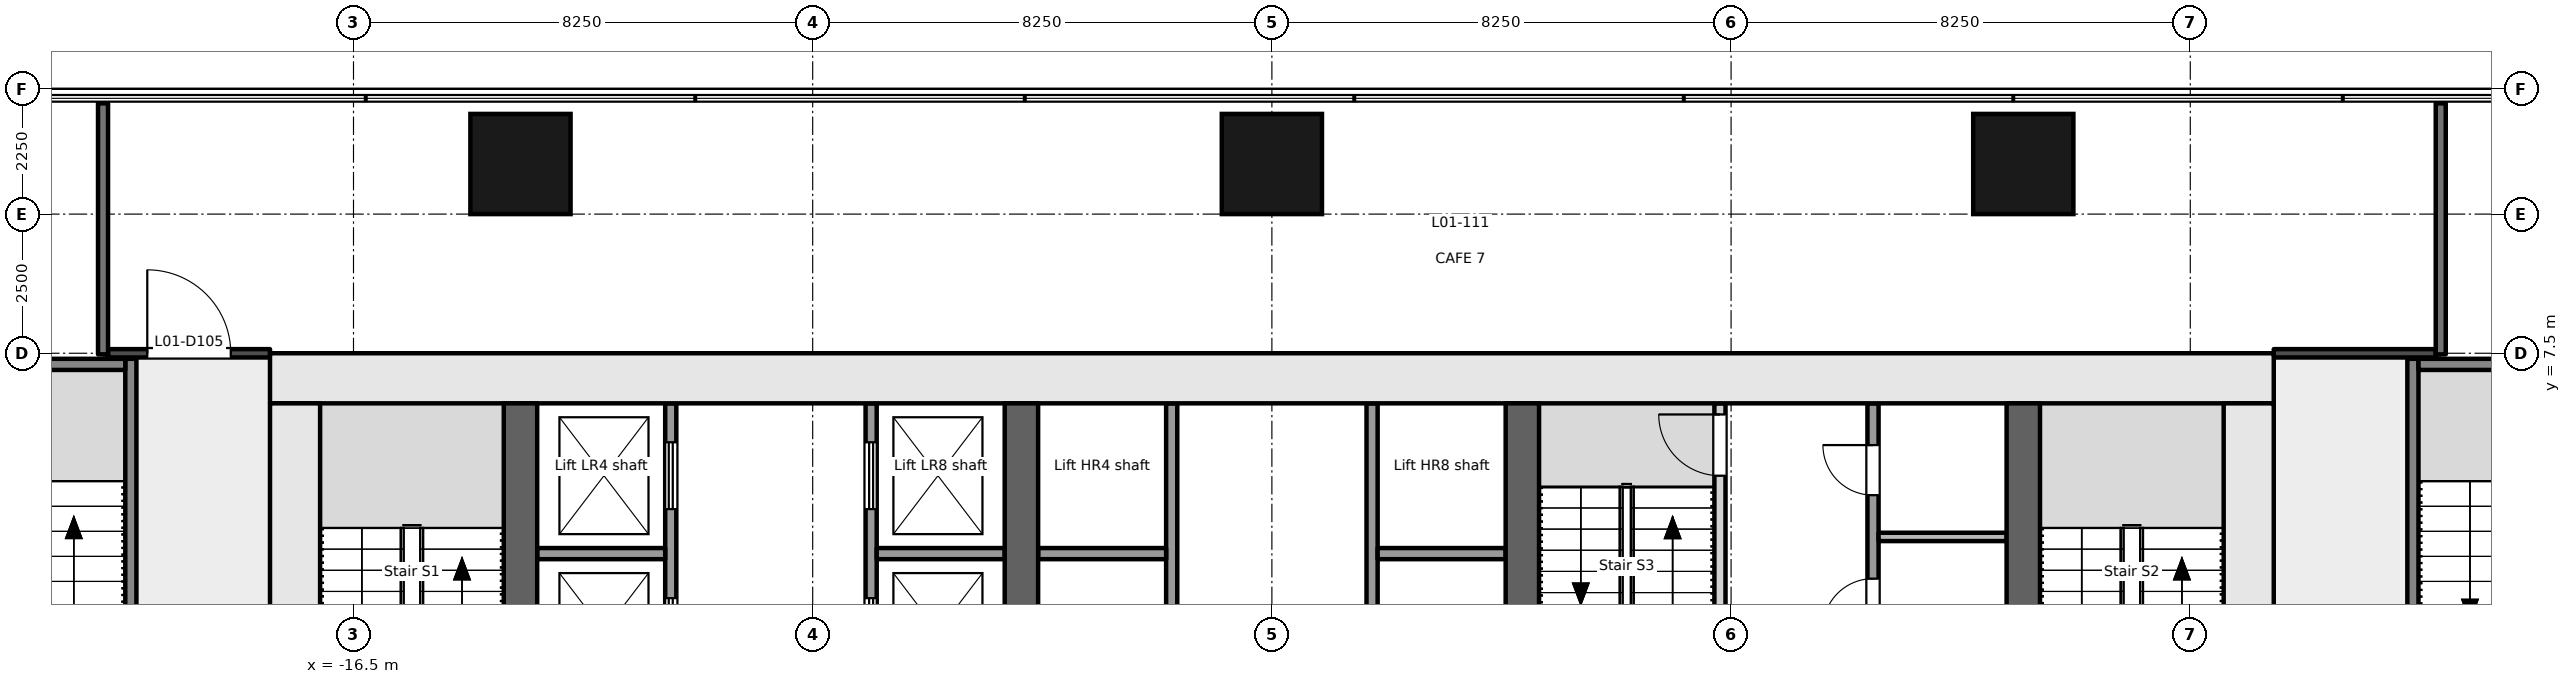
"""IFC4 building model, lengths in metres.
Left out: names, types, materials, properties, quantities, classifications, styles, units other than length and angle.
Written with IfcOpenShell. Run it as: python <this file> out.ifc"""

import sys

from ifc_helpers import new_model, si_unit, direction, frame, frame_2d, origin, origin_2d, place, context, subcontext, project, spatial, rectangle, extrude, element, fill, save


model = new_model("IFC4")
c1 = context("Model", 3, precision=1e-05, world=origin(), true_north=direction((0.0, 1.0)))
c2 = subcontext(c1, "Body", "Model", "MODEL_VIEW")
j1 = project(units=[si_unit("LENGTHUNIT", "METRE"), si_unit("PLANEANGLEUNIT", "RADIAN")], contexts=[c1])
p1 = place(None, origin())
s1 = spatial("IfcSite", under=j1, at=p1, CompositionType="ELEMENT")
p2 = place(p1, origin())
s2 = spatial("IfcBuilding", under=s1, at=p2, CompositionType="ELEMENT")
p3 = place(p2, frame((0.0, 0.0, 7.2)))
s3 = spatial("IfcBuildingStorey", under=s2, at=p3, CompositionType="ELEMENT", Elevation=7.2)
for number, where, z_axis, x_axis in (
    (1, (-13.5, 10.9, -0.2), (0.0, 0.0, 1.0), (1.0, 0.0, 0.0)),
    (2, (0.0, 10.9, -0.2), (0.0, 0.0, 1.0), (1.0, 0.0, 0.0)),
    (3, (13.5, 10.9, -0.2), (0.0, 0.0, 1.0), (1.0, 0.0, 0.0)),
):
    element("IfcColumn", number, at=place(p3, frame(where, z_axis=z_axis, x_axis=x_axis)), inside=s3, PredefinedType="COLUMN", context=c2, shape_type="SweptSolid", body=[
        extrude(rectangle(XDim=1.8, YDim=1.8, at=origin_2d()), origin(), (0.0, 0.0, 1.0), 5.4),
    ])
p4 = place(p3, frame((-18.0, 7.05, -0.2), z_axis=(0.0, 0.0, 1.0), x_axis=(1.0, 0.0, 0.0)))
e4 = element("IfcWall", 4, at=p4, inside=s3, PredefinedType="SHEAR", context=c2, shape_type="SweptSolid", body=[
    extrude(rectangle(XDim=36.0, YDim=0.9, at=frame_2d((18.0, 0.0))), origin(), (0.0, 0.0, 1.0), 5.4),
])
p5 = place(p3, frame((-17.55, -6.6, -0.2), z_axis=(0.0, 0.0, 1.0), x_axis=(0.0, 1.0, 0.0)))
e5 = element("IfcWall", 5, at=p5, inside=s3, PredefinedType="SHEAR", context=c2, shape_type="SweptSolid", body=[
    extrude(rectangle(XDim=13.2, YDim=0.9, at=frame_2d((6.6, 0.0))), origin(), (0.0, 0.0, 1.0), 5.4),
])
p6 = place(p5, frame((4.55, 0.0, 0.2)))
e6 = element("IfcOpeningElement", 6, at=p6, cuts=e5, PredefinedType="OPENING", context=c2, shape_type="SweptSolid", body=[
    extrude(rectangle(XDim=1.2, YDim=2.1, at=frame_2d((0.6, 1.05))), frame((0.0, 0.46, 0.0), z_axis=(0.0, -1.0, 0.0), x_axis=(1.0, 0.0, 0.0)), (0.0, 0.0, 1.0), 0.921),
])
p7 = place(p3, frame((17.55, -6.6, -0.2), z_axis=(0.0, 0.0, 1.0), x_axis=(0.0, 1.0, 0.0)))
e7 = element("IfcWall", 7, at=p7, inside=s3, PredefinedType="SHEAR", context=c2, shape_type="SweptSolid", body=[
    extrude(rectangle(XDim=13.2, YDim=0.9, at=frame_2d((6.6, 0.0))), origin(), (0.0, 0.0, 1.0), 5.4),
])
p8 = place(p7, frame((4.55, 0.0, 0.2)))
e8 = element("IfcOpeningElement", 8, at=p8, cuts=e7, PredefinedType="OPENING", context=c2, shape_type="SweptSolid", body=[
    extrude(rectangle(XDim=1.2, YDim=2.1, at=frame_2d((0.6, 1.05))), frame((0.0, 0.46, 0.0), z_axis=(0.0, -1.0, 0.0), x_axis=(1.0, 0.0, 0.0)), (0.0, 0.0, 1.0), 0.921),
])
for number, where, z_axis, x_axis in (
    (9, (-13.5, -6.6, -0.2), (0.0, 0.0, 1.0), (0.0, 1.0, 0.0)),
    (10, (-4.5, -6.6, -0.2), (0.0, 0.0, 1.0), (0.0, 1.0, 0.0)),
    (11, (4.5, -6.6, -0.2), (0.0, 0.0, 1.0), (0.0, 1.0, 0.0)),
    (12, (13.5, -6.6, -0.2), (0.0, 0.0, 1.0), (0.0, 1.0, 0.0)),
):
    element("IfcWall", number, at=place(p3, frame(where, z_axis=z_axis, x_axis=x_axis)), inside=s3, PredefinedType="SHEAR", context=c2, shape_type="SweptSolid", body=[
        extrude(rectangle(XDim=13.2, YDim=0.6, at=frame_2d((6.6, 0.0))), origin(), (0.0, 0.0, 1.0), 5.4),
    ])
p9 = place(p3, frame((-10.8, -6.6, 0.0), z_axis=(0.0, 0.0, 1.0), x_axis=(0.0, 1.0, 0.0)))
e13 = element("IfcWall", 13, at=p9, inside=s3, PredefinedType="PARTITIONING", context=c2, shape_type="SweptSolid", body=[
    extrude(rectangle(XDim=13.2, YDim=0.2, at=frame_2d((6.6, 0.0))), origin(), (0.0, 0.0, 1.0), 5.2),
])
p10 = place(p9, frame((0.55, 0.0, 0.0)))
e14 = element("IfcOpeningElement", 14, at=p10, cuts=e13, PredefinedType="OPENING", context=c2, shape_type="SweptSolid", body=[
    extrude(rectangle(XDim=0.9, YDim=2.1, at=frame_2d((0.45, 1.05))), frame((0.0, 0.111, 0.0), z_axis=(0.0, -1.0, 0.0), x_axis=(1.0, 0.0, 0.0)), (0.0, 0.0, 1.0), 0.221),
])
p11 = place(p9, frame((2.9, 0.0, 0.0)))
e15 = element("IfcOpeningElement", 15, at=p11, cuts=e13, PredefinedType="OPENING", context=c2, shape_type="SweptSolid", body=[
    extrude(rectangle(XDim=1.2, YDim=2.1, at=frame_2d((0.6, 1.05))), frame((0.0, 0.111, 0.0), z_axis=(0.0, -1.0, 0.0), x_axis=(1.0, 0.0, 0.0)), (0.0, 0.0, 1.0), 0.221),
])
p12 = place(p9, frame((5.7, 0.0, 0.0)))
e16 = element("IfcOpeningElement", 16, at=p12, cuts=e13, PredefinedType="OPENING", context=c2, shape_type="SweptSolid", body=[
    extrude(rectangle(XDim=1.2, YDim=2.1, at=frame_2d((0.6, 1.05))), frame((0.0, 0.111, 0.0), z_axis=(0.0, -1.0, 0.0), x_axis=(1.0, 0.0, 0.0)), (0.0, 0.0, 1.0), 0.221),
])
p13 = place(p9, frame((8.5, 0.0, 0.0)))
e17 = element("IfcOpeningElement", 17, at=p13, cuts=e13, PredefinedType="OPENING", context=c2, shape_type="SweptSolid", body=[
    extrude(rectangle(XDim=1.2, YDim=2.1, at=frame_2d((0.6, 1.05))), frame((0.0, 0.111, 0.0), z_axis=(0.0, -1.0, 0.0), x_axis=(1.0, 0.0, 0.0)), (0.0, 0.0, 1.0), 0.221),
])
p14 = place(p9, frame((11.3, 0.0, 0.0)))
e18 = element("IfcOpeningElement", 18, at=p14, cuts=e13, PredefinedType="OPENING", context=c2, shape_type="SweptSolid", body=[
    extrude(rectangle(XDim=1.2, YDim=2.1, at=frame_2d((0.6, 1.05))), frame((0.0, 0.111, 0.0), z_axis=(0.0, -1.0, 0.0), x_axis=(1.0, 0.0, 0.0)), (0.0, 0.0, 1.0), 0.221),
])
p15 = place(p3, frame((-7.2, -6.6, 0.0), z_axis=(0.0, 0.0, 1.0), x_axis=(0.0, 1.0, 0.0)))
e19 = element("IfcWall", 19, at=p15, inside=s3, PredefinedType="PARTITIONING", context=c2, shape_type="SweptSolid", body=[
    extrude(rectangle(XDim=13.2, YDim=0.2, at=frame_2d((6.6, 0.0))), origin(), (0.0, 0.0, 1.0), 5.2),
])
p16 = place(p15, frame((0.55, 0.0, 0.0)))
e20 = element("IfcOpeningElement", 20, at=p16, cuts=e19, PredefinedType="OPENING", context=c2, shape_type="SweptSolid", body=[
    extrude(rectangle(XDim=0.9, YDim=2.1, at=frame_2d((0.45, 1.05))), frame((0.0, 0.111, 0.0), z_axis=(0.0, -1.0, 0.0), x_axis=(1.0, 0.0, 0.0)), (0.0, 0.0, 1.0), 0.221),
])
p17 = place(p15, frame((2.9, 0.0, 0.0)))
e21 = element("IfcOpeningElement", 21, at=p17, cuts=e19, PredefinedType="OPENING", context=c2, shape_type="SweptSolid", body=[
    extrude(rectangle(XDim=1.2, YDim=2.1, at=frame_2d((0.6, 1.05))), frame((0.0, 0.111, 0.0), z_axis=(0.0, -1.0, 0.0), x_axis=(1.0, 0.0, 0.0)), (0.0, 0.0, 1.0), 0.221),
])
p18 = place(p15, frame((5.7, 0.0, 0.0)))
e22 = element("IfcOpeningElement", 22, at=p18, cuts=e19, PredefinedType="OPENING", context=c2, shape_type="SweptSolid", body=[
    extrude(rectangle(XDim=1.2, YDim=2.1, at=frame_2d((0.6, 1.05))), frame((0.0, 0.111, 0.0), z_axis=(0.0, -1.0, 0.0), x_axis=(1.0, 0.0, 0.0)), (0.0, 0.0, 1.0), 0.221),
])
p19 = place(p15, frame((8.5, 0.0, 0.0)))
e23 = element("IfcOpeningElement", 23, at=p19, cuts=e19, PredefinedType="OPENING", context=c2, shape_type="SweptSolid", body=[
    extrude(rectangle(XDim=1.2, YDim=2.1, at=frame_2d((0.6, 1.05))), frame((0.0, 0.111, 0.0), z_axis=(0.0, -1.0, 0.0), x_axis=(1.0, 0.0, 0.0)), (0.0, 0.0, 1.0), 0.221),
])
p20 = place(p15, frame((11.3, 0.0, 0.0)))
e24 = element("IfcOpeningElement", 24, at=p20, cuts=e19, PredefinedType="OPENING", context=c2, shape_type="SweptSolid", body=[
    extrude(rectangle(XDim=1.2, YDim=2.1, at=frame_2d((0.6, 1.05))), frame((0.0, 0.111, 0.0), z_axis=(0.0, -1.0, 0.0), x_axis=(1.0, 0.0, 0.0)), (0.0, 0.0, 1.0), 0.221),
])
for number, where, z_axis, x_axis in (
    (25, (-13.2, 3.9, 0.0), (0.0, 0.0, 1.0), (1.0, 0.0, 0.0)),
    (26, (-7.1, 3.9, 0.0), (0.0, 0.0, 1.0), (1.0, 0.0, 0.0)),
):
    element("IfcWall", number, at=place(p3, frame(where, z_axis=z_axis, x_axis=x_axis)), inside=s3, PredefinedType="PARTITIONING", context=c2, shape_type="SweptSolid", body=[
        extrude(rectangle(XDim=2.3, YDim=0.2, at=frame_2d((1.15, 0.0))), origin(), (0.0, 0.0, 1.0), 5.2),
    ])
p21 = place(p3, frame((-1.8, -6.6, 0.0), z_axis=(0.0, 0.0, 1.0), x_axis=(0.0, 1.0, 0.0)))
e27 = element("IfcWall", 27, at=p21, inside=s3, PredefinedType="PARTITIONING", context=c2, shape_type="SweptSolid", body=[
    extrude(rectangle(XDim=13.2, YDim=0.2, at=frame_2d((6.6, 0.0))), origin(), (0.0, 0.0, 1.0), 5.2),
])
p22 = place(p21, frame((0.55, 0.0, 0.0)))
e28 = element("IfcOpeningElement", 28, at=p22, cuts=e27, PredefinedType="OPENING", context=c2, shape_type="SweptSolid", body=[
    extrude(rectangle(XDim=0.9, YDim=2.1, at=frame_2d((0.45, 1.05))), frame((0.0, 0.111, 0.0), z_axis=(0.0, -1.0, 0.0), x_axis=(1.0, 0.0, 0.0)), (0.0, 0.0, 1.0), 0.221),
])
p23 = place(p3, frame((1.8, -6.6, 0.0), z_axis=(0.0, 0.0, 1.0), x_axis=(0.0, 1.0, 0.0)))
e29 = element("IfcWall", 29, at=p23, inside=s3, PredefinedType="PARTITIONING", context=c2, shape_type="SweptSolid", body=[
    extrude(rectangle(XDim=13.2, YDim=0.2, at=frame_2d((6.6, 0.0))), origin(), (0.0, 0.0, 1.0), 5.2),
])
p24 = place(p23, frame((0.55, 0.0, 0.0)))
e30 = element("IfcOpeningElement", 30, at=p24, cuts=e29, PredefinedType="OPENING", context=c2, shape_type="SweptSolid", body=[
    extrude(rectangle(XDim=0.9, YDim=2.1, at=frame_2d((0.45, 1.05))), frame((0.0, 0.111, 0.0), z_axis=(0.0, -1.0, 0.0), x_axis=(1.0, 0.0, 0.0)), (0.0, 0.0, 1.0), 0.221),
])
for number, where, z_axis, x_axis in (
    (31, (-4.2, 3.9, 0.0), (0.0, 0.0, 1.0), (1.0, 0.0, 0.0)),
    (32, (1.9, 3.9, 0.0), (0.0, 0.0, 1.0), (1.0, 0.0, 0.0)),
):
    element("IfcWall", number, at=place(p3, frame(where, z_axis=z_axis, x_axis=x_axis)), inside=s3, PredefinedType="PARTITIONING", context=c2, shape_type="SweptSolid", body=[
        extrude(rectangle(XDim=2.3, YDim=0.2, at=frame_2d((1.15, 0.0))), origin(), (0.0, 0.0, 1.0), 5.2),
    ])
p25 = place(p3, frame((8.05, -6.6, 0.0), z_axis=(0.0, 0.0, 1.0), x_axis=(0.0, 1.0, 0.0)))
e33 = element("IfcWall", 33, at=p25, inside=s3, PredefinedType="PARTITIONING", context=c2, shape_type="SweptSolid", body=[
    extrude(rectangle(XDim=13.2, YDim=0.2, at=frame_2d((6.6, 0.0))), origin(), (0.0, 0.0, 1.0), 5.2),
])
p26 = place(p25, frame((0.91, 0.0, 0.0)))
e34 = element("IfcOpeningElement", 34, at=p26, cuts=e33, PredefinedType="OPENING", context=c2, shape_type="SweptSolid", body=[
    extrude(rectangle(XDim=0.9, YDim=2.1, at=frame_2d((0.45, 1.05))), frame((0.0, 0.111, 0.0), z_axis=(0.0, -1.0, 0.0), x_axis=(1.0, 0.0, 0.0)), (0.0, 0.0, 1.0), 0.221),
])
p27 = place(p25, frame((3.46, 0.0, 0.0)))
e35 = element("IfcOpeningElement", 35, at=p27, cuts=e33, PredefinedType="OPENING", context=c2, shape_type="SweptSolid", body=[
    extrude(rectangle(XDim=0.9, YDim=2.1, at=frame_2d((0.45, 1.05))), frame((0.0, 0.111, 0.0), z_axis=(0.0, -1.0, 0.0), x_axis=(1.0, 0.0, 0.0)), (0.0, 0.0, 1.0), 0.221),
])
p28 = place(p25, frame((5.5, 0.0, 0.0)))
e36 = element("IfcOpeningElement", 36, at=p28, cuts=e33, PredefinedType="OPENING", context=c2, shape_type="SweptSolid", body=[
    extrude(rectangle(XDim=0.9, YDim=2.1, at=frame_2d((0.45, 1.05))), frame((0.0, 0.111, 0.0), z_axis=(0.0, -1.0, 0.0), x_axis=(1.0, 0.0, 0.0)), (0.0, 0.0, 1.0), 0.221),
])
p29 = place(p25, frame((11.9, 0.0, 0.0)))
e37 = element("IfcOpeningElement", 37, at=p29, cuts=e33, PredefinedType="OPENING", context=c2, shape_type="SweptSolid", body=[
    extrude(rectangle(XDim=1.1, YDim=2.1, at=frame_2d((0.55, 1.05))), frame((0.0, 0.111, 0.0), z_axis=(0.0, -1.0, 0.0), x_axis=(1.0, 0.0, 0.0)), (0.0, 0.0, 1.0), 0.221),
])
p30 = place(p3, frame((10.8, -6.6, 0.0), z_axis=(0.0, 0.0, 1.0), x_axis=(0.0, 1.0, 0.0)))
e38 = element("IfcWall", 38, at=p30, inside=s3, PredefinedType="PARTITIONING", context=c2, shape_type="SweptSolid", body=[
    extrude(rectangle(XDim=13.2, YDim=0.2, at=frame_2d((6.6, 0.0))), origin(), (0.0, 0.0, 1.0), 5.2),
])
p31 = place(p30, frame((0.7, 0.0, 0.0)))
e39 = element("IfcOpeningElement", 39, at=p31, cuts=e38, PredefinedType="OPENING", context=c2, shape_type="SweptSolid", body=[
    extrude(rectangle(XDim=1.2, YDim=2.1, at=frame_2d((0.6, 1.05))), frame((0.0, 0.111, 0.0), z_axis=(0.0, -1.0, 0.0), x_axis=(1.0, 0.0, 0.0)), (0.0, 0.0, 1.0), 0.221),
])
p32 = place(p30, frame((9.15, 0.0, 0.0)))
e40 = element("IfcOpeningElement", 40, at=p32, cuts=e38, PredefinedType="OPENING", context=c2, shape_type="SweptSolid", body=[
    extrude(rectangle(XDim=0.9, YDim=2.1, at=frame_2d((0.45, 1.05))), frame((0.0, 0.111, 0.0), z_axis=(0.0, -1.0, 0.0), x_axis=(1.0, 0.0, 0.0)), (0.0, 0.0, 1.0), 0.221),
])
p33 = place(p30, frame((11.55, 0.0, 0.0)))
e41 = element("IfcOpeningElement", 41, at=p33, cuts=e38, PredefinedType="OPENING", context=c2, shape_type="SweptSolid", body=[
    extrude(rectangle(XDim=0.9, YDim=2.1, at=frame_2d((0.45, 1.05))), frame((0.0, 0.111, 0.0), z_axis=(0.0, -1.0, 0.0), x_axis=(1.0, 0.0, 0.0)), (0.0, 0.0, 1.0), 0.221),
])
p34 = place(p3, frame((10.9, 4.2, 0.0), z_axis=(0.0, 0.0, 1.0), x_axis=(1.0, 0.0, 0.0)))
e42 = element("IfcWall", 42, at=p34, inside=s3, PredefinedType="PARTITIONING", context=c2, shape_type="SweptSolid", body=[
    extrude(rectangle(XDim=2.3, YDim=0.15, at=frame_2d((1.15, 0.0))), origin(), (0.0, 0.0, 1.0), 5.2),
])
p35 = place(p3, frame((-20.5, 7.4, -0.2), z_axis=(0.0, 0.0, 1.0), x_axis=(0.0, -1.0, 0.0)))
e43 = element("IfcWall", 43, at=p35, inside=s3, PredefinedType="SHEAR", context=c2, shape_type="SweptSolid", body=[
    extrude(rectangle(XDim=7.4, YDim=0.2, at=frame_2d((3.7, 0.0))), origin(), (0.0, 0.0, 1.0), 5.4),
])
p36 = place(p35, frame((5.375, 0.0, 0.2)))
e44 = element("IfcOpeningElement", 44, at=p36, cuts=e43, PredefinedType="OPENING", context=c2, shape_type="SweptSolid", body=[
    extrude(rectangle(XDim=1.8, YDim=2.1, at=frame_2d((0.9, 1.05))), frame((0.0, 0.111, 0.0), z_axis=(0.0, -1.0, 0.0), x_axis=(1.0, 0.0, 0.0)), (0.0, 0.0, 1.0), 0.221),
])
p37 = place(p3, frame((-25.1, 7.3, -0.2), z_axis=(0.0, 0.0, 1.0), x_axis=(1.0, 0.0, 0.0)))
e45 = element("IfcWall", 45, at=p37, inside=s3, PredefinedType="SHEAR", context=c2, shape_type="SweptSolid", body=[
    extrude(rectangle(XDim=4.5, YDim=0.2, at=frame_2d((2.25, 0.0))), origin(), (0.0, 0.0, 1.0), 5.4),
])
p38 = place(p3, frame((20.5, 0.0, -0.2), z_axis=(0.0, 0.0, 1.0), x_axis=(0.0, 1.0, 0.0)))
e46 = element("IfcWall", 46, at=p38, inside=s3, PredefinedType="SHEAR", context=c2, shape_type="SweptSolid", body=[
    extrude(rectangle(XDim=7.4, YDim=0.2, at=frame_2d((3.7, 0.0))), origin(), (0.0, 0.0, 1.0), 5.4),
])
p39 = place(p38, frame((0.225, 0.0, 0.2)))
e47 = element("IfcOpeningElement", 47, at=p39, cuts=e46, PredefinedType="OPENING", context=c2, shape_type="SweptSolid", body=[
    extrude(rectangle(XDim=1.8, YDim=2.1, at=frame_2d((0.9, 1.05))), frame((0.0, 0.111, 0.0), z_axis=(0.0, -1.0, 0.0), x_axis=(1.0, 0.0, 0.0)), (0.0, 0.0, 1.0), 0.221),
])
p40 = place(p3, frame((20.6, 7.3, -0.2), z_axis=(0.0, 0.0, 1.0), x_axis=(1.0, 0.0, 0.0)))
e48 = element("IfcWall", 48, at=p40, inside=s3, PredefinedType="SHEAR", context=c2, shape_type="SweptSolid", body=[
    extrude(rectangle(XDim=4.5, YDim=0.2, at=frame_2d((2.25, 0.0))), origin(), (0.0, 0.0, 1.0), 5.4),
])
p41 = place(p3, frame((-20.91, 7.499, 0.0), z_axis=(0.0, 0.0, 1.0), x_axis=(1.0, 0.0, 0.0)))
e49 = element("IfcWall", 49, at=p41, inside=s3, PredefinedType="PARTITIONING", context=c2, shape_type="SweptSolid", body=[
    extrude(rectangle(XDim=2.91, YDim=0.15, at=frame_2d((1.455, 0.0))), origin(), (0.0, 0.0, 1.0), 4.9),
])
p42 = place(p41, frame((0.705, 0.0, 0.0)))
e50 = element("IfcOpeningElement", 50, at=p42, cuts=e49, PredefinedType="OPENING", context=c2, shape_type="SweptSolid", body=[
    extrude(rectangle(XDim=1.5, YDim=2.1, at=frame_2d((0.75, 1.05))), frame((0.0, 0.085, 0.0), z_axis=(0.0, -1.0, 0.0), x_axis=(1.0, 0.0, 0.0)), (0.0, 0.0, 1.0), 0.171),
])
p43 = place(p3, frame((18.0, 7.499, 0.0), z_axis=(0.0, 0.0, 1.0), x_axis=(1.0, 0.0, 0.0)))
e51 = element("IfcWall", 51, at=p43, inside=s3, PredefinedType="PARTITIONING", context=c2, shape_type="SweptSolid", body=[
    extrude(rectangle(XDim=2.91, YDim=0.15, at=frame_2d((1.455, 0.0))), origin(), (0.0, 0.0, 1.0), 4.9),
])
for number, where, z_axis, x_axis in (
    (52, (-21.0, 11.99, 0.0), (0.0, 0.0, 1.0), (0.0, -1.0, 0.0)),
    (53, (21.0, 7.48, 0.0), (0.0, 0.0, 1.0), (0.0, 1.0, 0.0)),
):
    element("IfcWall", number, at=place(p3, frame(where, z_axis=z_axis, x_axis=x_axis)), inside=s3, PredefinedType="PARTITIONING", context=c2, shape_type="SweptSolid", body=[
        extrude(rectangle(XDim=4.51, YDim=0.18, at=frame_2d((2.255, 0.0))), origin(), (0.0, 0.0, 1.0), 4.2),
    ])
p44 = place(p13, origin())
e54 = element("IfcDoor", 54, at=p44, inside=s3, OperationType="DOUBLE_DOOR_SLIDING", PredefinedType="DOOR", context=c2, shape_type="SweptSolid", body=[
    extrude(rectangle(XDim=1.2, YDim=2.1, at=frame_2d((0.6, 1.05))), frame((0.0, 0.025, 0.0), z_axis=(0.0, -1.0, 0.0), x_axis=(1.0, 0.0, 0.0)), (0.0, 0.0, 1.0), 0.05),
])
fill(e17, e54)
p45 = place(p14, origin())
e55 = element("IfcDoor", 55, at=p45, inside=s3, OperationType="DOUBLE_DOOR_SLIDING", PredefinedType="DOOR", context=c2, shape_type="SweptSolid", body=[
    extrude(rectangle(XDim=1.2, YDim=2.1, at=frame_2d((0.6, 1.05))), frame((0.0, 0.025, 0.0), z_axis=(0.0, -1.0, 0.0), x_axis=(1.0, 0.0, 0.0)), (0.0, 0.0, 1.0), 0.05),
])
fill(e18, e55)
p46 = place(p19, origin())
e56 = element("IfcDoor", 56, at=p46, inside=s3, OperationType="DOUBLE_DOOR_SLIDING", PredefinedType="DOOR", context=c2, shape_type="SweptSolid", body=[
    extrude(rectangle(XDim=1.2, YDim=2.1, at=frame_2d((0.6, 1.05))), frame((0.0, 0.025, 0.0), z_axis=(0.0, -1.0, 0.0), x_axis=(1.0, 0.0, 0.0)), (0.0, 0.0, 1.0), 0.05),
])
fill(e23, e56)
p47 = place(p20, origin())
e57 = element("IfcDoor", 57, at=p47, inside=s3, OperationType="DOUBLE_DOOR_SLIDING", PredefinedType="DOOR", context=c2, shape_type="SweptSolid", body=[
    extrude(rectangle(XDim=1.2, YDim=2.1, at=frame_2d((0.6, 1.05))), frame((0.0, 0.025, 0.0), z_axis=(0.0, -1.0, 0.0), x_axis=(1.0, 0.0, 0.0)), (0.0, 0.0, 1.0), 0.05),
])
fill(e24, e57)
p48 = place(p29, origin())
e58 = element("IfcDoor", 58, at=p48, inside=s3, OperationType="SINGLE_SWING_RIGHT", PredefinedType="DOOR", context=c2, shape_type="SweptSolid", body=[
    extrude(rectangle(XDim=1.1, YDim=2.1, at=frame_2d((0.55, 1.05))), frame((0.0, 0.025, 0.0), z_axis=(0.0, -1.0, 0.0), x_axis=(1.0, 0.0, 0.0)), (0.0, 0.0, 1.0), 0.05),
])
fill(e37, e58)
p49 = place(p32, origin())
e59 = element("IfcDoor", 59, at=p49, inside=s3, OperationType="SINGLE_SWING_LEFT", PredefinedType="DOOR", context=c2, shape_type="SweptSolid", body=[
    extrude(rectangle(XDim=0.9, YDim=2.1, at=frame_2d((0.45, 1.05))), frame((0.0, 0.025, 0.0), z_axis=(0.0, -1.0, 0.0), x_axis=(1.0, 0.0, 0.0)), (0.0, 0.0, 1.0), 0.05),
])
fill(e40, e59)
p50 = place(p33, origin())
e60 = element("IfcDoor", 60, at=p50, inside=s3, OperationType="SINGLE_SWING_RIGHT", PredefinedType="DOOR", context=c2, shape_type="SweptSolid", body=[
    extrude(rectangle(XDim=0.9, YDim=2.1, at=frame_2d((0.45, 1.05))), frame((0.0, 0.025, 0.0), z_axis=(0.0, -1.0, 0.0), x_axis=(1.0, 0.0, 0.0)), (0.0, 0.0, 1.0), 0.05),
])
fill(e41, e60)
p51 = place(p42, origin())
e61 = element("IfcDoor", 61, at=p51, inside=s3, OperationType="DOUBLE_DOOR_SINGLE_SWING", PredefinedType="DOOR", context=c2, shape_type="SweptSolid", body=[
    extrude(rectangle(XDim=1.5, YDim=2.1, at=frame_2d((0.75, 1.05))), frame((0.0, 0.025, 0.0), z_axis=(0.0, -1.0, 0.0), x_axis=(1.0, 0.0, 0.0)), (0.0, 0.0, 1.0), 0.05),
])
fill(e50, e61)
save(model, sys.argv[1])
